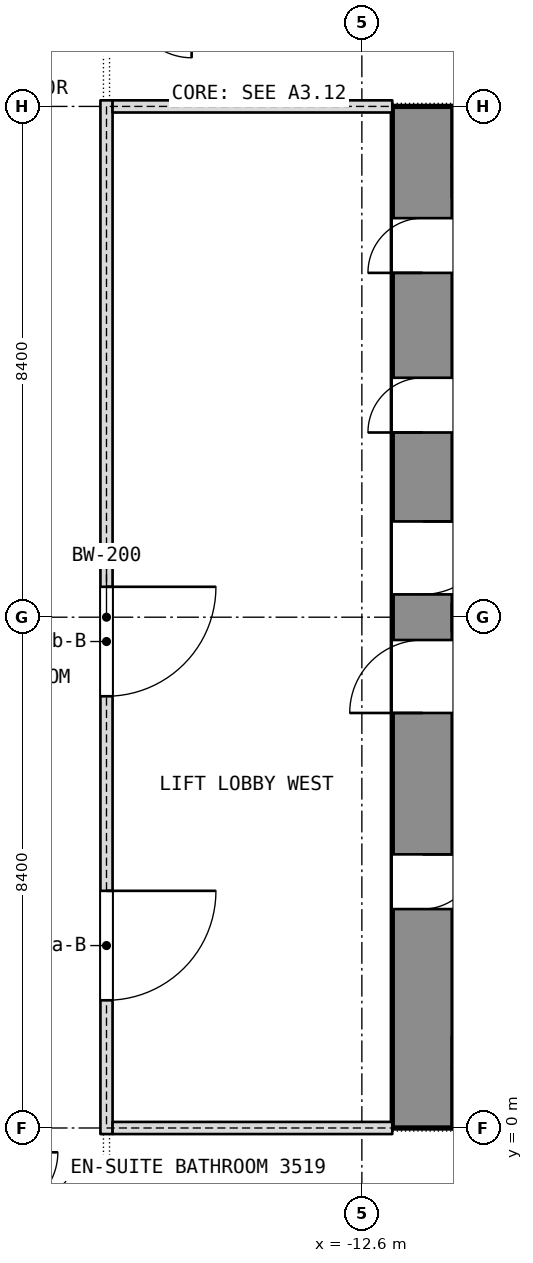
"""IFC4 building model, lengths in metres.
Left out: names, types, materials, properties, quantities, classifications, styles, units other than length and angle.
Written with IfcOpenShell. Run it as: python <this file> out.ifc"""

import sys

from ifc_helpers import new_model, si_unit, direction, frame, frame_2d, origin, place, context, subcontext, project, spatial, rectangle, extrude, element, fill, save


model = new_model("IFC4")
c1 = context("Model", 3, precision=1e-05, world=origin(), true_north=direction((0.0, 1.0)))
c2 = subcontext(c1, "Body", "Model", "MODEL_VIEW")
j1 = project(units=[si_unit("LENGTHUNIT", "METRE"), si_unit("PLANEANGLEUNIT", "RADIAN")], contexts=[c1])
p1 = place(None, origin())
s1 = spatial("IfcSite", under=j1, at=p1, CompositionType="ELEMENT")
p2 = place(p1, origin())
s2 = spatial("IfcBuilding", under=s1, at=p2, CompositionType="ELEMENT")
p3 = place(p2, frame((0.0, 0.0, 151.7)))
s3 = spatial("IfcBuildingStorey", under=s2, at=p3, CompositionType="ELEMENT", Elevation=151.7)
p4 = place(p3, frame((-11.6, 0.0, 0.0), z_axis=(0.0, 0.0, 1.0), x_axis=(0.0, 1.0, 0.0)))
e1 = element("IfcWall", 1, at=p4, inside=s3, PredefinedType="SHEAR", context=c2, shape_type="SweptSolid", body=[
    extrude(rectangle(XDim=16.8, YDim=1.0, at=frame_2d((8.4, 0.0))), origin(), (0.0, 0.0, 1.0), 3.6),
])
p5 = place(p4, frame((3.6, 0.0, 0.0)))
e2 = element("IfcOpeningElement", 2, at=p5, cuts=e1, PredefinedType="OPENING", context=c2, shape_type="SweptSolid", body=[
    extrude(rectangle(XDim=0.9, YDim=2.1, at=frame_2d((0.45, 1.05))), frame((0.0, 0.5, 0.0), z_axis=(0.0, -1.0, 0.0), x_axis=(1.0, 0.0, 0.0)), (0.0, 0.0, 1.0), 1.0),
])
p6 = place(p4, frame((6.825, 0.0, 0.0)))
e3 = element("IfcOpeningElement", 3, at=p6, cuts=e1, PredefinedType="OPENING", context=c2, shape_type="SweptSolid", body=[
    extrude(rectangle(XDim=1.2, YDim=2.1, at=frame_2d((0.6, 1.05))), frame((0.0, 0.5, 0.0), z_axis=(0.0, -1.0, 0.0), x_axis=(1.0, 0.0, 0.0)), (0.0, 0.0, 1.0), 1.0),
])
p7 = place(p4, frame((14.062, 0.0, 0.0)))
e4 = element("IfcOpeningElement", 4, at=p7, cuts=e1, PredefinedType="OPENING", context=c2, shape_type="SweptSolid", body=[
    extrude(rectangle(XDim=0.9, YDim=2.1, at=frame_2d((0.45, 1.05))), frame((0.0, 0.5, 0.0), z_axis=(0.0, -1.0, 0.0), x_axis=(1.0, 0.0, 0.0)), (0.0, 0.0, 1.0), 1.0),
])
p8 = place(p4, frame((11.438, 0.0, 0.0)))
e5 = element("IfcOpeningElement", 5, at=p8, cuts=e1, PredefinedType="OPENING", context=c2, shape_type="SweptSolid", body=[
    extrude(rectangle(XDim=0.9, YDim=2.1, at=frame_2d((0.45, 1.05))), frame((0.0, 0.5, 0.0), z_axis=(0.0, -1.0, 0.0), x_axis=(1.0, 0.0, 0.0)), (0.0, 0.0, 1.0), 1.0),
])
p9 = place(p4, frame((8.775, 0.0, 0.0)))
e6 = element("IfcOpeningElement", 6, at=p9, cuts=e1, PredefinedType="OPENING", context=c2, shape_type="SweptSolid", body=[
    extrude(rectangle(XDim=1.2, YDim=2.1, at=frame_2d((0.6, 1.05))), frame((0.0, 0.5, 0.0), z_axis=(0.0, -1.0, 0.0), x_axis=(1.0, 0.0, 0.0)), (0.0, 0.0, 1.0), 1.0),
])
p10 = place(p3, frame((-11.1, 8.4, 0.0), z_axis=(0.0, 0.0, 1.0), x_axis=(1.0, 0.0, 0.0)))
e7 = element("IfcWall", 7, at=p10, inside=s3, PredefinedType="SHEAR", context=c2, shape_type="SweptSolid", body=[
    extrude(rectangle(XDim=6.675, YDim=0.45, at=frame_2d((3.337, 0.0))), origin(), (0.0, 0.0, 1.0), 3.6),
])
p11 = place(p3, frame((-16.8, -0.1, 0.0), z_axis=(0.0, 0.0, 1.0), x_axis=(0.0, 1.0, 0.0)))
e8 = element("IfcWall", 8, at=p11, inside=s3, PredefinedType="PARTITIONING", context=c2, shape_type="SweptSolid", body=[
    extrude(rectangle(XDim=17.0, YDim=0.2, at=frame_2d((8.5, 0.0))), origin(), (0.0, 0.0, 1.0), 3.34),
])
p12 = place(p11, frame((2.2, 0.0, 0.0)))
e9 = element("IfcOpeningElement", 9, at=p12, cuts=e8, PredefinedType="OPENING", context=c2, shape_type="SweptSolid", body=[
    extrude(rectangle(XDim=1.8, YDim=2.1, at=frame_2d((0.9, 1.05))), frame((0.0, 0.1, 0.0), z_axis=(0.0, -1.0, 0.0), x_axis=(1.0, 0.0, 0.0)), (0.0, 0.0, 1.0), 0.2),
])
p13 = place(p11, frame((7.2, 0.0, 0.0)))
e10 = element("IfcOpeningElement", 10, at=p13, cuts=e8, PredefinedType="OPENING", context=c2, shape_type="SweptSolid", body=[
    extrude(rectangle(XDim=1.8, YDim=2.1, at=frame_2d((0.9, 1.05))), frame((0.0, 0.1, 0.0), z_axis=(0.0, -1.0, 0.0), x_axis=(1.0, 0.0, 0.0)), (0.0, 0.0, 1.0), 0.2),
])
for number, where, z_axis, x_axis in (
    (11, (-16.7, 0.0, 0.0), (0.0, 0.0, 1.0), (1.0, 0.0, 0.0)),
    (12, (-16.7, 16.8, 0.0), (0.0, 0.0, 1.0), (1.0, 0.0, 0.0)),
):
    element("IfcWall", number, at=place(p3, frame(where, z_axis=z_axis, x_axis=x_axis)), inside=s3, PredefinedType="PARTITIONING", context=c2, shape_type="SweptSolid", body=[
        extrude(rectangle(XDim=4.6, YDim=0.2, at=frame_2d((2.3, 0.0))), origin(), (0.0, 0.0, 1.0), 2.89),
    ])
p14 = place(p5, origin())
e13 = element("IfcDoor", 13, at=p14, inside=s3, OperationType="SINGLE_SWING_LEFT", PredefinedType="DOOR", context=c2, shape_type="SweptSolid", body=[
    extrude(rectangle(XDim=0.9, YDim=2.1, at=frame_2d((0.45, 1.05))), frame((0.0, 0.025, 0.0), z_axis=(0.0, -1.0, 0.0), x_axis=(1.0, 0.0, 0.0)), (0.0, 0.0, 1.0), 0.05),
])
fill(e2, e13)
p15 = place(p6, origin())
e14 = element("IfcDoor", 14, at=p15, inside=s3, OperationType="SINGLE_SWING_LEFT", PredefinedType="DOOR", context=c2, shape_type="SweptSolid", body=[
    extrude(rectangle(XDim=1.2, YDim=2.1, at=frame_2d((0.6, 1.05))), frame((0.0, 0.025, 0.0), z_axis=(0.0, -1.0, 0.0), x_axis=(1.0, 0.0, 0.0)), (0.0, 0.0, 1.0), 0.05),
])
fill(e3, e14)
p16 = place(p7, origin())
e15 = element("IfcDoor", 15, at=p16, inside=s3, OperationType="SINGLE_SWING_LEFT", PredefinedType="DOOR", context=c2, shape_type="SweptSolid", body=[
    extrude(rectangle(XDim=0.9, YDim=2.1, at=frame_2d((0.45, 1.05))), frame((0.0, 0.025, 0.0), z_axis=(0.0, -1.0, 0.0), x_axis=(1.0, 0.0, 0.0)), (0.0, 0.0, 1.0), 0.05),
])
fill(e4, e15)
p17 = place(p8, origin())
e16 = element("IfcDoor", 16, at=p17, inside=s3, OperationType="SINGLE_SWING_LEFT", PredefinedType="DOOR", context=c2, shape_type="SweptSolid", body=[
    extrude(rectangle(XDim=0.9, YDim=2.1, at=frame_2d((0.45, 1.05))), frame((0.0, 0.025, 0.0), z_axis=(0.0, -1.0, 0.0), x_axis=(1.0, 0.0, 0.0)), (0.0, 0.0, 1.0), 0.05),
])
fill(e5, e16)
p18 = place(p9, origin())
e17 = element("IfcDoor", 17, at=p18, inside=s3, OperationType="SINGLE_SWING_LEFT", PredefinedType="DOOR", context=c2, shape_type="SweptSolid", body=[
    extrude(rectangle(XDim=1.2, YDim=2.1, at=frame_2d((0.6, 1.05))), frame((0.0, 0.025, 0.0), z_axis=(0.0, -1.0, 0.0), x_axis=(1.0, 0.0, 0.0)), (0.0, 0.0, 1.0), 0.05),
])
fill(e6, e17)
p19 = place(p12, origin())
e18 = element("IfcDoor", 18, at=p19, inside=s3, OperationType="DOUBLE_DOOR_SINGLE_SWING", PredefinedType="DOOR", context=c2, shape_type="SweptSolid", body=[
    extrude(rectangle(XDim=1.8, YDim=2.1, at=frame_2d((0.9, 1.05))), frame((0.0, 0.025, 0.0), z_axis=(0.0, -1.0, 0.0), x_axis=(1.0, 0.0, 0.0)), (0.0, 0.0, 1.0), 0.05),
])
fill(e9, e18)
p20 = place(p13, origin())
e19 = element("IfcDoor", 19, at=p20, inside=s3, OperationType="DOUBLE_DOOR_SINGLE_SWING", PredefinedType="DOOR", context=c2, shape_type="SweptSolid", body=[
    extrude(rectangle(XDim=1.8, YDim=2.1, at=frame_2d((0.9, 1.05))), frame((0.0, 0.025, 0.0), z_axis=(0.0, -1.0, 0.0), x_axis=(1.0, 0.0, 0.0)), (0.0, 0.0, 1.0), 0.05),
])
fill(e10, e19)
save(model, sys.argv[1])
